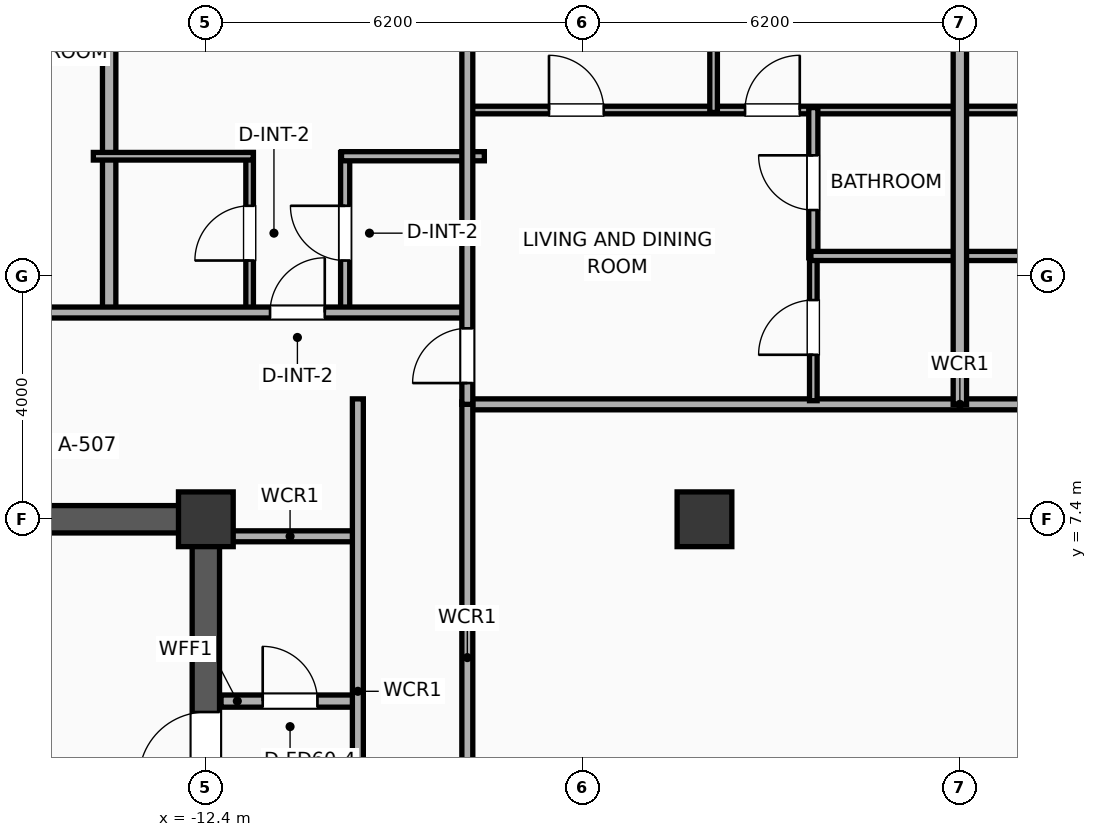
"""IFC4 building model, lengths in metres.
Left out: names, types, materials, properties, quantities, classifications, styles, units other than length and angle.
Written with IfcOpenShell. Run it as: python <this file> out.ifc"""

import sys

from ifc_helpers import new_model, si_unit, direction, frame, frame_2d, origin, origin_2d, place, context, subcontext, project, spatial, rectangle, extrude, element, fill, save


model = new_model("IFC4")
c1 = context("Model", 3, precision=1e-05, world=origin(), true_north=direction((0.0, 1.0)))
c2 = subcontext(c1, "Body", "Model", "MODEL_VIEW")
j1 = project(units=[si_unit("LENGTHUNIT", "METRE"), si_unit("PLANEANGLEUNIT", "RADIAN")], contexts=[c1])
p1 = place(None, origin())
s1 = spatial("IfcSite", under=j1, at=p1, CompositionType="ELEMENT")
p2 = place(p1, origin())
s2 = spatial("IfcBuilding", under=s1, at=p2, CompositionType="ELEMENT")
p3 = place(p2, frame((0.0, 0.0, 175.5)))
s3 = spatial("IfcBuildingStorey", under=s2, at=p3, CompositionType="ELEMENT", Elevation=175.5)
p4 = place(p3, frame((-12.4, 7.4, 0.0), z_axis=(0.0, 0.0, 1.0), x_axis=(1.0, 0.0, 0.0)))
e1 = element("IfcColumn", 1, at=p4, inside=s3, PredefinedType="COLUMN", context=c2, shape_type="SweptSolid", body=[
    extrude(rectangle(XDim=0.9, YDim=0.9, at=origin_2d()), origin(), (0.0, 0.0, 1.0), 3.9),
])
p5 = place(p3, frame((-19.425, 7.4, 0.0), z_axis=(0.0, 0.0, 1.0), x_axis=(1.0, 0.0, 0.0)))
e2 = element("IfcWall", 2, at=p5, inside=s3, PredefinedType="SHEAR", context=c2, shape_type="SweptSolid", body=[
    extrude(rectangle(XDim=7.25, YDim=0.45, at=frame_2d((3.625, 0.0))), origin(), (0.0, 0.0, 1.0), 3.65),
])
p6 = place(p3, frame((-12.4, -7.4, 0.0), z_axis=(0.0, 0.0, 1.0), x_axis=(0.0, 1.0, 0.0)))
e3 = element("IfcWall", 3, at=p6, inside=s3, PredefinedType="SHEAR", context=c2, shape_type="SweptSolid", body=[
    extrude(rectangle(XDim=14.8, YDim=0.45, at=frame_2d((7.4, 0.0))), origin(), (0.0, 0.0, 1.0), 3.65),
])
p7 = place(p6, frame((6.05, 0.0, 0.0)))
e4 = element("IfcOpeningElement", 4, at=p7, cuts=e3, PredefinedType="OPENING", context=c2, shape_type="SweptSolid", body=[
    extrude(rectangle(XDim=1.1, YDim=2.05, at=frame_2d((0.55, 1.025))), frame((0.0, 0.235, 0.0), z_axis=(0.0, -1.0, 0.0), x_axis=(1.0, 0.0, 0.0)), (0.0, 0.0, 1.0), 0.47),
])
p8 = place(p6, frame((10.53, 0.0, 0.0)))
e5 = element("IfcOpeningElement", 5, at=p8, cuts=e3, PredefinedType="OPENING", context=c2, shape_type="SweptSolid", body=[
    extrude(rectangle(XDim=1.1, YDim=2.05, at=frame_2d((0.55, 1.025))), frame((0.0, 0.235, 0.0), z_axis=(0.0, -1.0, 0.0), x_axis=(1.0, 0.0, 0.0)), (0.0, 0.0, 1.0), 0.47),
])
p9 = place(p6, frame((0.85, 0.0, 0.0)))
e6 = element("IfcOpeningElement", 6, at=p9, cuts=e3, PredefinedType="OPENING", context=c2, shape_type="SweptSolid", body=[
    extrude(rectangle(XDim=0.9, YDim=2.05, at=frame_2d((0.45, 1.025))), frame((0.0, 0.235, 0.0), z_axis=(0.0, -1.0, 0.0), x_axis=(1.0, 0.0, 0.0)), (0.0, 0.0, 1.0), 0.47),
])
p10 = place(p6, frame((3.4, 0.0, 0.0)))
e7 = element("IfcOpeningElement", 7, at=p10, cuts=e3, PredefinedType="OPENING", context=c2, shape_type="SweptSolid", body=[
    extrude(rectangle(XDim=0.9, YDim=2.05, at=frame_2d((0.45, 1.025))), frame((0.0, 0.235, 0.0), z_axis=(0.0, -1.0, 0.0), x_axis=(1.0, 0.0, 0.0)), (0.0, 0.0, 1.0), 0.47),
])
p11 = place(p3, frame((-4.2, 7.4, 0.0), z_axis=(0.0, 0.0, 1.0), x_axis=(1.0, 0.0, 0.0)))
e8 = element("IfcColumn", 8, at=p11, inside=s3, PredefinedType="COLUMN", context=c2, shape_type="SweptSolid", body=[
    extrude(rectangle(XDim=0.9, YDim=0.9, at=origin_2d()), origin(), (0.0, 0.0, 1.0), 3.9),
])
p12 = place(p3, frame((-12.15, 4.41, 0.0), z_axis=(0.0, 0.0, 1.0), x_axis=(1.0, 0.0, 0.0)))
e9 = element("IfcWall", 9, at=p12, inside=s3, PredefinedType="PARTITIONING", context=c2, shape_type="SweptSolid", body=[
    extrude(rectangle(XDim=2.27, YDim=0.2, at=frame_2d((1.135, 0.0))), origin(), (0.0, 0.0, 1.0), 3.65),
])
p13 = place(p12, frame((0.685, 0.0, 0.0)))
e10 = element("IfcOpeningElement", 10, at=p13, cuts=e9, PredefinedType="OPENING", context=c2, shape_type="SweptSolid", body=[
    extrude(rectangle(XDim=0.9, YDim=2.05, at=frame_2d((0.45, 1.025))), frame((0.0, 0.11, 0.0), z_axis=(0.0, -1.0, 0.0), x_axis=(1.0, 0.0, 0.0)), (0.0, 0.0, 1.0), 0.22),
])
p14 = place(p3, frame((-12.15, 7.12, 0.0), z_axis=(0.0, 0.0, 1.0), x_axis=(1.0, 0.0, 0.0)))
e11 = element("IfcWall", 11, at=p14, inside=s3, PredefinedType="PARTITIONING", context=c2, shape_type="SweptSolid", body=[
    extrude(rectangle(XDim=2.27, YDim=0.18, at=frame_2d((1.135, 0.0))), origin(), (0.0, 0.0, 1.0), 3.65),
])
p15 = place(p3, frame((-9.9, -9.38, 0.0), z_axis=(0.0, 0.0, 1.0), x_axis=(0.0, 1.0, 0.0)))
e12 = element("IfcWall", 12, at=p15, inside=s3, PredefinedType="PARTITIONING", context=c2, shape_type="SweptSolid", body=[
    extrude(rectangle(XDim=18.76, YDim=0.18, at=frame_2d((9.38, 0.0))), origin(), (0.0, 0.0, 1.0), 3.65),
])
p16 = place(p15, frame((7.892, 0.0, 0.0)))
e13 = element("IfcOpeningElement", 13, at=p16, cuts=e12, PredefinedType="OPENING", context=c2, shape_type="SweptSolid", body=[
    extrude(rectangle(XDim=1.1, YDim=2.05, at=frame_2d((0.55, 1.025))), frame((0.0, 0.1, 0.0), z_axis=(0.0, -1.0, 0.0), x_axis=(1.0, 0.0, 0.0)), (0.0, 0.0, 1.0), 0.2),
])
p17 = place(p3, frame((-8.15, 9.29, 0.0), z_axis=(0.0, 0.0, 1.0), x_axis=(1.0, 0.0, 0.0)))
e14 = element("IfcWall", 14, at=p17, inside=s3, PredefinedType="PARTITIONING", context=c2, shape_type="SweptSolid", body=[
    extrude(rectangle(XDim=16.3, YDim=0.18, at=frame_2d((8.15, 0.0))), origin(), (0.0, 0.0, 1.0), 3.65),
])
p18 = place(p3, frame((-8.1, 0.92, 0.0), z_axis=(0.0, 0.0, 1.0), x_axis=(0.0, 1.0, 0.0)))
e15 = element("IfcWall", 15, at=p18, inside=s3, PredefinedType="PARTITIONING", context=c2, shape_type="SweptSolid", body=[
    extrude(rectangle(XDim=8.41, YDim=0.18, at=frame_2d((4.205, 0.0))), origin(), (0.0, 0.0, 1.0), 3.65),
])
p19 = place(p3, frame((-13.99, 10.72, 0.0), z_axis=(0.0, 0.0, 1.0), x_axis=(0.0, 1.0, 0.0)))
e16 = element("IfcWall", 16, at=p19, inside=s3, PredefinedType="PARTITIONING", context=c2, shape_type="SweptSolid", body=[
    extrude(rectangle(XDim=7.887, YDim=0.22, at=frame_2d((3.944, 0.0))), origin(), (0.0, 0.0, 1.0), 3.65),
])
p20 = place(p3, frame((-11.68, 10.78, 0.0), z_axis=(0.0, 0.0, 1.0), x_axis=(0.0, 1.0, 0.0)))
e17 = element("IfcWall", 17, at=p20, inside=s3, PredefinedType="PARTITIONING", context=c2, shape_type="SweptSolid", body=[
    extrude(rectangle(XDim=2.65, YDim=0.125, at=frame_2d((1.325, 0.0))), origin(), (0.0, 0.0, 1.0), 3.04),
])
p21 = place(p20, frame((0.875, 0.0, 0.0)))
e18 = element("IfcOpeningElement", 18, at=p21, cuts=e17, PredefinedType="OPENING", context=c2, shape_type="SweptSolid", body=[
    extrude(rectangle(XDim=0.9, YDim=2.05, at=frame_2d((0.45, 1.025))), frame((0.0, 0.073, 0.0), z_axis=(0.0, -1.0, 0.0), x_axis=(1.0, 0.0, 0.0)), (0.0, 0.0, 1.0), 0.145),
])
p22 = place(p3, frame((-10.109, 10.78, 0.0), z_axis=(0.0, 0.0, 1.0), x_axis=(0.0, 1.0, 0.0)))
e19 = element("IfcWall", 19, at=p22, inside=s3, PredefinedType="PLUMBINGWALL", context=c2, shape_type="SweptSolid", body=[
    extrude(rectangle(XDim=2.65, YDim=0.15, at=frame_2d((1.325, 0.0))), origin(), (0.0, 0.0, 1.0), 3.65),
])
p23 = place(p22, frame((0.875, 0.0, 0.0)))
e20 = element("IfcOpeningElement", 20, at=p23, cuts=e19, PredefinedType="OPENING", context=c2, shape_type="SweptSolid", body=[
    extrude(rectangle(XDim=0.9, YDim=2.05, at=frame_2d((0.45, 1.025))), frame((0.0, 0.085, 0.0), z_axis=(0.0, -1.0, 0.0), x_axis=(1.0, 0.0, 0.0)), (0.0, 0.0, 1.0), 0.17),
])
p24 = place(p3, frame((-14.25, 13.37, 0.0), z_axis=(0.0, 0.0, 1.0), x_axis=(1.0, 0.0, 0.0)))
e21 = element("IfcWall", 21, at=p24, inside=s3, PredefinedType="PARTITIONING", context=c2, shape_type="SweptSolid", body=[
    extrude(rectangle(XDim=2.63, YDim=0.125, at=frame_2d((1.315, 0.0))), origin(), (0.0, 0.0, 1.0), 3.65),
])
p25 = place(p3, frame((-10.169, 13.37, 0.0), z_axis=(0.0, 0.0, 1.0), x_axis=(1.0, 0.0, 0.0)))
e22 = element("IfcWall", 22, at=p25, inside=s3, PredefinedType="PLUMBINGWALL", context=c2, shape_type="SweptSolid", body=[
    extrude(rectangle(XDim=2.349, YDim=0.15, at=frame_2d((1.174, 0.0))), origin(), (0.0, 0.0, 1.0), 3.65),
])
p26 = place(p3, frame((-20.0, 10.8, 0.0), z_axis=(0.0, 0.0, 1.0), x_axis=(1.0, 0.0, 0.0)))
e23 = element("IfcWall", 23, at=p26, inside=s3, PredefinedType="PARTITIONING", context=c2, shape_type="SweptSolid", body=[
    extrude(rectangle(XDim=11.92, YDim=0.18, at=frame_2d((5.96, 0.0))), origin(), (0.0, 0.0, 1.0), 3.65),
])
p27 = place(p26, frame((3.64, 0.0, 0.0)))
e24 = element("IfcOpeningElement", 24, at=p27, cuts=e23, PredefinedType="OPENING", context=c2, shape_type="SweptSolid", body=[
    extrude(rectangle(XDim=1.15, YDim=2.05, at=frame_2d((0.575, 1.025))), frame((0.0, 0.1, 0.0), z_axis=(0.0, -1.0, 0.0), x_axis=(1.0, 0.0, 0.0)), (0.0, 0.0, 1.0), 0.2),
])
p28 = place(p26, frame((8.656, 0.0, 0.0)))
e25 = element("IfcOpeningElement", 25, at=p28, cuts=e23, PredefinedType="OPENING", context=c2, shape_type="SweptSolid", body=[
    extrude(rectangle(XDim=0.9, YDim=2.05, at=frame_2d((0.45, 1.025))), frame((0.0, 0.1, 0.0), z_axis=(0.0, -1.0, 0.0), x_axis=(1.0, 0.0, 0.0)), (0.0, 0.0, 1.0), 0.2),
])
p29 = place(p3, frame((-8.08, 14.13, 0.0), z_axis=(0.0, 0.0, 1.0), x_axis=(1.0, 0.0, 0.0)))
e26 = element("IfcWall", 26, at=p29, inside=s3, PredefinedType="PARTITIONING", context=c2, shape_type="SweptSolid", body=[
    extrude(rectangle(XDim=8.06, YDim=0.125, at=frame_2d((4.03, 0.0))), origin(), (0.0, 0.0, 1.0), 3.65),
])
p30 = place(p29, frame((1.323, 0.0, 0.0)))
e27 = element("IfcOpeningElement", 27, at=p30, cuts=e26, PredefinedType="OPENING", context=c2, shape_type="SweptSolid", body=[
    extrude(rectangle(XDim=0.9, YDim=2.05, at=frame_2d((0.45, 1.025))), frame((0.0, 0.073, 0.0), z_axis=(0.0, -1.0, 0.0), x_axis=(1.0, 0.0, 0.0)), (0.0, 0.0, 1.0), 0.145),
])
p31 = place(p29, frame((4.547, 0.0, 0.0)))
e28 = element("IfcOpeningElement", 28, at=p31, cuts=e26, PredefinedType="OPENING", context=c2, shape_type="SweptSolid", body=[
    extrude(rectangle(XDim=0.9, YDim=2.05, at=frame_2d((0.45, 1.025))), frame((0.0, 0.073, 0.0), z_axis=(0.0, -1.0, 0.0), x_axis=(1.0, 0.0, 0.0)), (0.0, 0.0, 1.0), 0.145),
])
p32 = place(p3, frame((-2.41, 9.35, 0.0), z_axis=(0.0, 0.0, 1.0), x_axis=(0.0, 1.0, 0.0)))
e29 = element("IfcWall", 29, at=p32, inside=s3, PredefinedType="PARTITIONING", context=c2, shape_type="SweptSolid", body=[
    extrude(rectangle(XDim=2.41, YDim=0.125, at=frame_2d((1.205, 0.0))), origin(), (0.0, 0.0, 1.0), 3.65),
])
p33 = place(p32, frame((0.755, 0.0, 0.0)))
e30 = element("IfcOpeningElement", 30, at=p33, cuts=e29, PredefinedType="OPENING", context=c2, shape_type="SweptSolid", body=[
    extrude(rectangle(XDim=0.9, YDim=2.05, at=frame_2d((0.45, 1.025))), frame((0.0, 0.073, 0.0), z_axis=(0.0, -1.0, 0.0), x_axis=(1.0, 0.0, 0.0)), (0.0, 0.0, 1.0), 0.145),
])
p34 = place(p3, frame((-2.41, 11.7, 0.0), z_axis=(0.0, 0.0, 1.0), x_axis=(0.0, 1.0, 0.0)))
e31 = element("IfcWall", 31, at=p34, inside=s3, PredefinedType="PLUMBINGWALL", context=c2, shape_type="SweptSolid", body=[
    extrude(rectangle(XDim=2.47, YDim=0.15, at=frame_2d((1.235, 0.0))), origin(), (0.0, 0.0, 1.0), 3.04),
])
p35 = place(p34, frame((0.785, 0.0, 0.0)))
e32 = element("IfcOpeningElement", 32, at=p35, cuts=e31, PredefinedType="OPENING", context=c2, shape_type="SweptSolid", body=[
    extrude(rectangle(XDim=0.9, YDim=2.05, at=frame_2d((0.45, 1.025))), frame((0.0, 0.085, 0.0), z_axis=(0.0, -1.0, 0.0), x_axis=(1.0, 0.0, 0.0)), (0.0, 0.0, 1.0), 0.17),
])
p36 = place(p3, frame((-2.45, 11.73, 0.0), z_axis=(0.0, 0.0, 1.0), x_axis=(1.0, 0.0, 0.0)))
e33 = element("IfcWall", 33, at=p36, inside=s3, PredefinedType="PLUMBINGWALL", context=c2, shape_type="SweptSolid", body=[
    extrude(rectangle(XDim=2.43, YDim=0.15, at=frame_2d((1.215, 0.0))), origin(), (0.0, 0.0, 1.0), 3.65),
])
p37 = place(p3, frame((-4.05, 14.09, 0.0), z_axis=(0.0, 0.0, 1.0), x_axis=(0.0, 1.0, 0.0)))
e34 = element("IfcWall", 34, at=p37, inside=s3, PredefinedType="PARTITIONING", context=c2, shape_type="SweptSolid", body=[
    extrude(rectangle(XDim=5.562, YDim=0.125, at=frame_2d((2.781, 0.0))), origin(), (0.0, 0.0, 1.0), 3.65),
])
p38 = place(p3, frame((-8.1, 9.29, 0.0), z_axis=(0.0, 0.0, 1.0), x_axis=(0.0, 1.0, 0.0)))
e35 = element("IfcWall", 35, at=p38, inside=s3, PredefinedType="PARTITIONING", context=c2, shape_type="SweptSolid", body=[
    extrude(rectangle(XDim=9.936, YDim=0.18, at=frame_2d((4.968, 0.0))), origin(), (0.0, 0.0, 1.0), 3.65),
])
p39 = place(p38, frame((0.35, 0.0, 0.0)))
e36 = element("IfcOpeningElement", 36, at=p39, cuts=e35, PredefinedType="OPENING", context=c2, shape_type="SweptSolid", body=[
    extrude(rectangle(XDim=0.9, YDim=2.05, at=frame_2d((0.45, 1.025))), frame((0.0, 0.1, 0.0), z_axis=(0.0, -1.0, 0.0), x_axis=(1.0, 0.0, 0.0)), (0.0, 0.0, 1.0), 0.2),
])
p40 = place(p3, frame((0.02, 14.13, 0.0), z_axis=(0.0, 0.0, 1.0), x_axis=(1.0, 0.0, 0.0)))
e37 = element("IfcWall", 37, at=p40, inside=s3, PredefinedType="PARTITIONING", context=c2, shape_type="SweptSolid", body=[
    extrude(rectangle(XDim=8.06, YDim=0.125, at=frame_2d((4.03, 0.0))), origin(), (0.0, 0.0, 1.0), 3.65),
])
p41 = place(p40, frame((1.323, 0.0, 0.0)))
e38 = element("IfcOpeningElement", 38, at=p41, cuts=e37, PredefinedType="OPENING", context=c2, shape_type="SweptSolid", body=[
    extrude(rectangle(XDim=0.9, YDim=2.05, at=frame_2d((0.45, 1.025))), frame((0.0, 0.073, 0.0), z_axis=(0.0, -1.0, 0.0), x_axis=(1.0, 0.0, 0.0)), (0.0, 0.0, 1.0), 0.145),
])
p42 = place(p40, frame((5.837, 0.0, 0.0)))
e39 = element("IfcOpeningElement", 39, at=p42, cuts=e37, PredefinedType="OPENING", context=c2, shape_type="SweptSolid", body=[
    extrude(rectangle(XDim=0.9, YDim=2.05, at=frame_2d((0.45, 1.025))), frame((0.0, 0.073, 0.0), z_axis=(0.0, -1.0, 0.0), x_axis=(1.0, 0.0, 0.0)), (0.0, 0.0, 1.0), 0.145),
])
p43 = place(p3, frame((0.02, 11.73, 0.0), z_axis=(0.0, 0.0, 1.0), x_axis=(1.0, 0.0, 0.0)))
e40 = element("IfcWall", 40, at=p43, inside=s3, PredefinedType="PLUMBINGWALL", context=c2, shape_type="SweptSolid", body=[
    extrude(rectangle(XDim=2.43, YDim=0.15, at=frame_2d((1.215, 0.0))), origin(), (0.0, 0.0, 1.0), 3.65),
])
p44 = place(p3, frame((0.0, 9.29, 0.0), z_axis=(0.0, 0.0, 1.0), x_axis=(0.0, 1.0, 0.0)))
e41 = element("IfcWall", 41, at=p44, inside=s3, PredefinedType="PARTITIONING", context=c2, shape_type="SweptSolid", body=[
    extrude(rectangle(XDim=10.788, YDim=0.22, at=frame_2d((5.394, 0.0))), origin(), (0.0, 0.0, 1.0), 3.04),
])
p45 = place(p13, origin())
e42 = element("IfcDoor", 42, at=p45, inside=s3, OperationType="SINGLE_SWING_LEFT", PredefinedType="DOOR", context=c2, shape_type="SweptSolid", body=[
    extrude(rectangle(XDim=0.9, YDim=2.05, at=frame_2d((0.45, 1.025))), frame((0.0, 0.025, 0.0), z_axis=(0.0, -1.0, 0.0), x_axis=(1.0, 0.0, 0.0)), (0.0, 0.0, 1.0), 0.05),
])
fill(e10, e42)
p46 = place(p21, origin())
e43 = element("IfcDoor", 43, at=p46, inside=s3, OperationType="SINGLE_SWING_LEFT", PredefinedType="DOOR", context=c2, shape_type="SweptSolid", body=[
    extrude(rectangle(XDim=0.9, YDim=2.05, at=frame_2d((0.45, 1.025))), frame((0.0, 0.025, 0.0), z_axis=(0.0, -1.0, 0.0), x_axis=(1.0, 0.0, 0.0)), (0.0, 0.0, 1.0), 0.05),
])
fill(e18, e43)
p47 = place(p23, origin())
e44 = element("IfcDoor", 44, at=p47, inside=s3, OperationType="SINGLE_SWING_RIGHT", PredefinedType="DOOR", context=c2, shape_type="SweptSolid", body=[
    extrude(rectangle(XDim=0.9, YDim=2.05, at=frame_2d((0.45, 1.025))), frame((0.0, 0.025, 0.0), z_axis=(0.0, -1.0, 0.0), x_axis=(1.0, 0.0, 0.0)), (0.0, 0.0, 1.0), 0.05),
])
fill(e20, e44)
p48 = place(p28, origin())
e45 = element("IfcDoor", 45, at=p48, inside=s3, OperationType="SINGLE_SWING_RIGHT", PredefinedType="DOOR", context=c2, shape_type="SweptSolid", body=[
    extrude(rectangle(XDim=0.9, YDim=2.05, at=frame_2d((0.45, 1.025))), frame((0.0, 0.025, 0.0), z_axis=(0.0, -1.0, 0.0), x_axis=(1.0, 0.0, 0.0)), (0.0, 0.0, 1.0), 0.05),
])
fill(e25, e45)
p49 = place(p30, origin())
e46 = element("IfcDoor", 46, at=p49, inside=s3, OperationType="SINGLE_SWING_LEFT", PredefinedType="DOOR", context=c2, shape_type="SweptSolid", body=[
    extrude(rectangle(XDim=0.9, YDim=2.05, at=frame_2d((0.45, 1.025))), frame((0.0, 0.025, 0.0), z_axis=(0.0, -1.0, 0.0), x_axis=(1.0, 0.0, 0.0)), (0.0, 0.0, 1.0), 0.05),
])
fill(e27, e46)
p50 = place(p31, origin())
e47 = element("IfcDoor", 47, at=p50, inside=s3, OperationType="SINGLE_SWING_RIGHT", PredefinedType="DOOR", context=c2, shape_type="SweptSolid", body=[
    extrude(rectangle(XDim=0.9, YDim=2.05, at=frame_2d((0.45, 1.025))), frame((0.0, 0.025, 0.0), z_axis=(0.0, -1.0, 0.0), x_axis=(1.0, 0.0, 0.0)), (0.0, 0.0, 1.0), 0.05),
])
fill(e28, e47)
p51 = place(p33, origin())
e48 = element("IfcDoor", 48, at=p51, inside=s3, OperationType="SINGLE_SWING_LEFT", PredefinedType="DOOR", context=c2, shape_type="SweptSolid", body=[
    extrude(rectangle(XDim=0.9, YDim=2.05, at=frame_2d((0.45, 1.025))), frame((0.0, 0.025, 0.0), z_axis=(0.0, -1.0, 0.0), x_axis=(1.0, 0.0, 0.0)), (0.0, 0.0, 1.0), 0.05),
])
fill(e30, e48)
p52 = place(p35, origin())
e49 = element("IfcDoor", 49, at=p52, inside=s3, OperationType="SINGLE_SWING_RIGHT", PredefinedType="DOOR", context=c2, shape_type="SweptSolid", body=[
    extrude(rectangle(XDim=0.9, YDim=2.05, at=frame_2d((0.45, 1.025))), frame((0.0, 0.025, 0.0), z_axis=(0.0, -1.0, 0.0), x_axis=(1.0, 0.0, 0.0)), (0.0, 0.0, 1.0), 0.05),
])
fill(e32, e49)
p53 = place(p39, origin())
e50 = element("IfcDoor", 50, at=p53, inside=s3, OperationType="SINGLE_SWING_LEFT", PredefinedType="DOOR", context=c2, shape_type="SweptSolid", body=[
    extrude(rectangle(XDim=0.9, YDim=2.05, at=frame_2d((0.45, 1.025))), frame((0.0, 0.025, 0.0), z_axis=(0.0, -1.0, 0.0), x_axis=(1.0, 0.0, 0.0)), (0.0, 0.0, 1.0), 0.05),
])
fill(e36, e50)
p54 = place(p8, origin())
e51 = element("IfcDoor", 51, at=p54, inside=s3, OperationType="SINGLE_SWING_LEFT", PredefinedType="DOOR", context=c2, shape_type="SweptSolid", body=[
    extrude(rectangle(XDim=1.1, YDim=2.05, at=frame_2d((0.55, 1.025))), frame((0.0, 0.025, 0.0), z_axis=(0.0, -1.0, 0.0), x_axis=(1.0, 0.0, 0.0)), (0.0, 0.0, 1.0), 0.05),
])
fill(e5, e51)
save(model, sys.argv[1])
